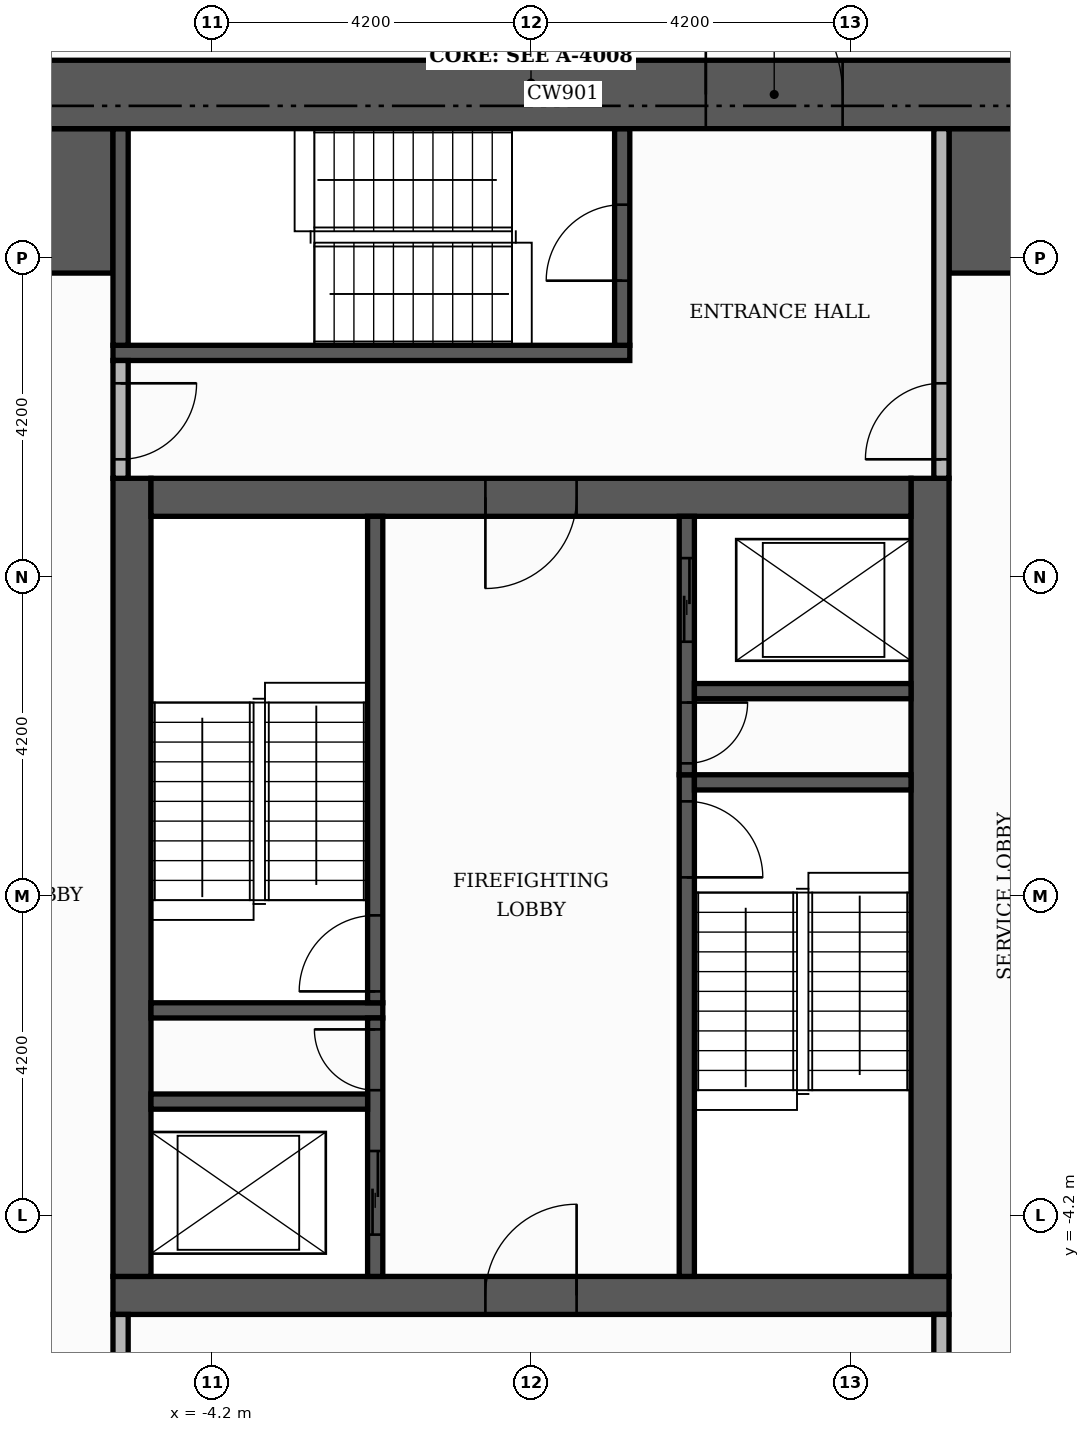
"""IFC4 building model, lengths in metres.
Left out: names, types, materials, properties, quantities, classifications, styles, units other than length and angle.
Written with IfcOpenShell. Run it as: python <this file> out.ifc"""

import sys

from ifc_helpers import new_model, si_unit, direction, frame, frame_2d, origin, place, context, subcontext, project, spatial, rectangle, extrude, element, fill, save


model = new_model("IFC4")
c1 = context("Model", 3, precision=1e-05, world=origin(), true_north=direction((0.0, 1.0)))
c2 = subcontext(c1, "Body", "Model", "MODEL_VIEW")
j1 = project(units=[si_unit("LENGTHUNIT", "METRE"), si_unit("PLANEANGLEUNIT", "RADIAN")], contexts=[c1])
p1 = place(None, origin())
s1 = spatial("IfcSite", under=j1, at=p1, CompositionType="ELEMENT")
p2 = place(p1, origin())
s2 = spatial("IfcBuilding", under=s1, at=p2, CompositionType="ELEMENT")
p3 = place(p2, frame((0.0, 0.0, 27.0)))
s3 = spatial("IfcBuildingStorey", under=s2, at=p3, CompositionType="ELEMENT", Elevation=27.0)
p4 = place(p3, frame((-5.5, -5.25, 0.0), z_axis=(0.0, 0.0, 1.0), x_axis=(1.0, 0.0, 0.0)))
e1 = element("IfcWall", 1, at=p4, inside=s3, PredefinedType="SHEAR", context=c2, shape_type="SweptSolid", body=[
    extrude(rectangle(XDim=11.0, YDim=0.5, at=frame_2d((5.5, 0.0))), origin(), (0.0, 0.0, 1.0), 3.48),
])
p5 = place(p4, frame((4.9, 0.0, 0.0)))
e2 = element("IfcOpeningElement", 2, at=p5, cuts=e1, PredefinedType="OPENING", context=c2, shape_type="SweptSolid", body=[
    extrude(rectangle(XDim=1.2, YDim=2.1, at=frame_2d((0.6, 1.05))), frame((0.0, 0.26, 0.0), z_axis=(0.0, -1.0, 0.0), x_axis=(1.0, 0.0, 0.0)), (0.0, 0.0, 1.0), 0.52),
])
for number, where, z_axis, x_axis in (
    (3, (-5.25, -5.0, 0.0), (0.0, 0.0, 1.0), (0.0, 1.0, 0.0)),
    (4, (5.25, -5.0, 0.0), (0.0, 0.0, 1.0), (0.0, 1.0, 0.0)),
):
    element("IfcWall", number, at=place(p3, frame(where, z_axis=z_axis, x_axis=x_axis)), inside=s3, PredefinedType="SHEAR", context=c2, shape_type="SweptSolid", body=[
        extrude(rectangle(XDim=10.5, YDim=0.5, at=frame_2d((5.25, 0.0))), origin(), (0.0, 0.0, 1.0), 3.48),
    ])
p6 = place(p3, frame((-5.0, 5.25, 0.0), z_axis=(0.0, 0.0, 1.0), x_axis=(1.0, 0.0, 0.0)))
e5 = element("IfcWall", 5, at=p6, inside=s3, PredefinedType="SHEAR", context=c2, shape_type="SweptSolid", body=[
    extrude(rectangle(XDim=10.0, YDim=0.5, at=frame_2d((5.0, 0.0))), origin(), (0.0, 0.0, 1.0), 3.48),
])
p7 = place(p6, frame((4.4, 0.0, 0.0)))
e6 = element("IfcOpeningElement", 6, at=p7, cuts=e5, PredefinedType="OPENING", context=c2, shape_type="SweptSolid", body=[
    extrude(rectangle(XDim=1.2, YDim=2.1, at=frame_2d((0.6, 1.05))), frame((0.0, 0.26, 0.0), z_axis=(0.0, -1.0, 0.0), x_axis=(1.0, 0.0, 0.0)), (0.0, 0.0, 1.0), 0.52),
])
for number, where, z_axis, x_axis in (
    (7, (-10.1, 9.15, 0.0), (0.0, 0.0, 1.0), (1.0, 0.0, 0.0)),
    (8, (5.5, 9.15, 0.0), (0.0, 0.0, 1.0), (1.0, 0.0, 0.0)),
):
    element("IfcWall", number, at=place(p3, frame(where, z_axis=z_axis, x_axis=x_axis)), inside=s3, PredefinedType="SHEAR", context=c2, shape_type="SweptSolid", body=[
        extrude(rectangle(XDim=4.6, YDim=1.9, at=frame_2d((2.3, 0.0))), origin(), (0.0, 0.0, 1.0), 3.48),
    ])
p8 = place(p3, frame((2.05, -5.0, 0.0), z_axis=(0.0, 0.0, 1.0), x_axis=(0.0, 1.0, 0.0)))
e9 = element("IfcWall", 9, at=p8, inside=s3, PredefinedType="SHEAR", context=c2, shape_type="SweptSolid", body=[
    extrude(rectangle(XDim=6.6, YDim=0.2, at=frame_2d((3.3, 0.0))), origin(), (0.0, 0.0, 1.0), 3.48),
])
p9 = place(p8, frame((5.25, 0.0, 0.0)))
e10 = element("IfcOpeningElement", 10, at=p9, cuts=e9, PredefinedType="OPENING", context=c2, shape_type="SweptSolid", body=[
    extrude(rectangle(XDim=1.0, YDim=2.1, at=frame_2d((0.5, 1.05))), frame((0.0, 0.11, 0.0), z_axis=(0.0, -1.0, 0.0), x_axis=(1.0, 0.0, 0.0)), (0.0, 0.0, 1.0), 0.22),
])
p10 = place(p3, frame((-5.0, -1.5, 0.0), z_axis=(0.0, 0.0, 1.0), x_axis=(1.0, 0.0, 0.0)))
e11 = element("IfcWall", 11, at=p10, inside=s3, PredefinedType="SHEAR", context=c2, shape_type="SweptSolid", body=[
    extrude(rectangle(XDim=3.05, YDim=0.2, at=frame_2d((1.525, 0.0))), origin(), (0.0, 0.0, 1.0), 3.48),
])
p11 = place(p3, frame((-2.05, -1.4, 0.0), z_axis=(0.0, 0.0, 1.0), x_axis=(0.0, 1.0, 0.0)))
e12 = element("IfcWall", 12, at=p11, inside=s3, PredefinedType="SHEAR", context=c2, shape_type="SweptSolid", body=[
    extrude(rectangle(XDim=6.4, YDim=0.2, at=frame_2d((3.2, 0.0))), origin(), (0.0, 0.0, 1.0), 3.48),
])
p12 = place(p11, frame((0.15, 0.0, 0.0)))
e13 = element("IfcOpeningElement", 13, at=p12, cuts=e12, PredefinedType="OPENING", context=c2, shape_type="SweptSolid", body=[
    extrude(rectangle(XDim=1.0, YDim=2.1, at=frame_2d((0.5, 1.05))), frame((0.0, 0.11, 0.0), z_axis=(0.0, -1.0, 0.0), x_axis=(1.0, 0.0, 0.0)), (0.0, 0.0, 1.0), 0.22),
])
p13 = place(p3, frame((2.15, 1.5, 0.0), z_axis=(0.0, 0.0, 1.0), x_axis=(1.0, 0.0, 0.0)))
e14 = element("IfcWall", 14, at=p13, inside=s3, PredefinedType="SHEAR", context=c2, shape_type="SweptSolid", body=[
    extrude(rectangle(XDim=2.85, YDim=0.2, at=frame_2d((1.425, 0.0))), origin(), (0.0, 0.0, 1.0), 3.48),
])
p14 = place(p3, frame((-5.5, 7.15, 0.0), z_axis=(0.0, 0.0, 1.0), x_axis=(1.0, 0.0, 0.0)))
e15 = element("IfcWall", 15, at=p14, inside=s3, PredefinedType="SHEAR", context=c2, shape_type="SweptSolid", body=[
    extrude(rectangle(XDim=6.8, YDim=0.2, at=frame_2d((3.4, 0.0))), origin(), (0.0, 0.0, 1.0), 3.48),
])
p15 = place(p3, frame((-5.4, 7.25, 0.0), z_axis=(0.0, 0.0, 1.0), x_axis=(0.0, 1.0, 0.0)))
e16 = element("IfcWall", 16, at=p15, inside=s3, PredefinedType="SHEAR", context=c2, shape_type="SweptSolid", body=[
    extrude(rectangle(XDim=2.85, YDim=0.2, at=frame_2d((1.425, 0.0))), origin(), (0.0, 0.0, 1.0), 3.48),
])
p16 = place(p3, frame((1.2, 7.25, 0.0), z_axis=(0.0, 0.0, 1.0), x_axis=(0.0, 1.0, 0.0)))
e17 = element("IfcWall", 17, at=p16, inside=s3, PredefinedType="SHEAR", context=c2, shape_type="SweptSolid", body=[
    extrude(rectangle(XDim=2.85, YDim=0.2, at=frame_2d((1.425, 0.0))), origin(), (0.0, 0.0, 1.0), 3.48),
])
p17 = place(p16, frame((0.85, 0.0, 0.0)))
e18 = element("IfcOpeningElement", 18, at=p17, cuts=e17, PredefinedType="OPENING", context=c2, shape_type="SweptSolid", body=[
    extrude(rectangle(XDim=1.0, YDim=2.1, at=frame_2d((0.5, 1.05))), frame((0.0, 0.11, 0.0), z_axis=(0.0, -1.0, 0.0), x_axis=(1.0, 0.0, 0.0)), (0.0, 0.0, 1.0), 0.22),
])
p18 = place(p3, frame((-2.05, -5.0, 0.0), z_axis=(0.0, 0.0, 1.0), x_axis=(0.0, 1.0, 0.0)))
e19 = element("IfcWall", 19, at=p18, inside=s3, PredefinedType="SHEAR", context=c2, shape_type="SweptSolid", body=[
    extrude(rectangle(XDim=3.4, YDim=0.2, at=frame_2d((1.7, 0.0))), origin(), (0.0, 0.0, 1.0), 3.48),
])
p19 = place(p18, frame((0.55, 0.0, 0.0)))
e20 = element("IfcOpeningElement", 20, at=p19, cuts=e19, PredefinedType="OPENING", context=c2, shape_type="SweptSolid", body=[
    extrude(rectangle(XDim=1.1, YDim=2.1, at=frame_2d((0.55, 1.05))), frame((0.0, 0.11, 0.0), z_axis=(0.0, -1.0, 0.0), x_axis=(1.0, 0.0, 0.0)), (0.0, 0.0, 1.0), 0.22),
])
p20 = place(p18, frame((2.45, 0.0, 0.0)))
e21 = element("IfcOpeningElement", 21, at=p20, cuts=e19, PredefinedType="OPENING", context=c2, shape_type="SweptSolid", body=[
    extrude(rectangle(XDim=0.8, YDim=2.1, at=frame_2d((0.4, 1.05))), frame((0.0, 0.11, 0.0), z_axis=(0.0, -1.0, 0.0), x_axis=(1.0, 0.0, 0.0)), (0.0, 0.0, 1.0), 0.22),
])
p21 = place(p3, frame((-5.0, -2.7, 0.0), z_axis=(0.0, 0.0, 1.0), x_axis=(1.0, 0.0, 0.0)))
e22 = element("IfcWall", 22, at=p21, inside=s3, PredefinedType="SHEAR", context=c2, shape_type="SweptSolid", body=[
    extrude(rectangle(XDim=2.85, YDim=0.2, at=frame_2d((1.425, 0.0))), origin(), (0.0, 0.0, 1.0), 3.48),
])
p22 = place(p3, frame((2.05, 1.6, 0.0), z_axis=(0.0, 0.0, 1.0), x_axis=(0.0, 1.0, 0.0)))
e23 = element("IfcWall", 23, at=p22, inside=s3, PredefinedType="SHEAR", context=c2, shape_type="SweptSolid", body=[
    extrude(rectangle(XDim=3.4, YDim=0.2, at=frame_2d((1.7, 0.0))), origin(), (0.0, 0.0, 1.0), 3.48),
])
p23 = place(p22, frame((1.75, 0.0, 0.0)))
e24 = element("IfcOpeningElement", 24, at=p23, cuts=e23, PredefinedType="OPENING", context=c2, shape_type="SweptSolid", body=[
    extrude(rectangle(XDim=1.1, YDim=2.1, at=frame_2d((0.55, 1.05))), frame((0.0, 0.11, 0.0), z_axis=(0.0, -1.0, 0.0), x_axis=(1.0, 0.0, 0.0)), (0.0, 0.0, 1.0), 0.22),
])
p24 = place(p22, frame((0.15, 0.0, 0.0)))
e25 = element("IfcOpeningElement", 25, at=p24, cuts=e23, PredefinedType="OPENING", context=c2, shape_type="SweptSolid", body=[
    extrude(rectangle(XDim=0.8, YDim=2.1, at=frame_2d((0.4, 1.05))), frame((0.0, 0.11, 0.0), z_axis=(0.0, -1.0, 0.0), x_axis=(1.0, 0.0, 0.0)), (0.0, 0.0, 1.0), 0.22),
])
p25 = place(p3, frame((2.15, 2.7, 0.0), z_axis=(0.0, 0.0, 1.0), x_axis=(1.0, 0.0, 0.0)))
e26 = element("IfcWall", 26, at=p25, inside=s3, PredefinedType="SHEAR", context=c2, shape_type="SweptSolid", body=[
    extrude(rectangle(XDim=2.85, YDim=0.2, at=frame_2d((1.425, 0.0))), origin(), (0.0, 0.0, 1.0), 3.48),
])
p26 = place(p3, frame((-11.0, 10.55, 0.0), z_axis=(0.0, 0.0, 1.0), x_axis=(1.0, 0.0, 0.0)))
e27 = element("IfcWall", 27, at=p26, inside=s3, PredefinedType="SHEAR", context=c2, shape_type="SweptSolid", body=[
    extrude(rectangle(XDim=22.0, YDim=0.9, at=frame_2d((11.0, 0.0))), origin(), (0.0, 0.0, 1.0), 3.48),
])
p27 = place(p26, frame((13.3, 0.0, 0.0)))
e28 = element("IfcOpeningElement", 28, at=p27, cuts=e27, PredefinedType="OPENING", context=c2, shape_type="SweptSolid", body=[
    extrude(rectangle(XDim=1.8, YDim=2.2, at=frame_2d((0.9, 1.1))), frame((0.0, 0.46, 0.0), z_axis=(0.0, -1.0, 0.0), x_axis=(1.0, 0.0, 0.0)), (0.0, 0.0, 1.0), 0.92),
])
p28 = place(p3, frame((-5.4, -10.1, 0.0), z_axis=(0.0, 0.0, 1.0), x_axis=(0.0, 1.0, 0.0)))
e29 = element("IfcWall", 29, at=p28, inside=s3, PredefinedType="PARTITIONING", context=c2, shape_type="SweptSolid", body=[
    extrude(rectangle(XDim=4.6, YDim=0.2, at=frame_2d((2.3, 0.0))), origin(), (0.0, 0.0, 1.0), 3.48),
])
p29 = place(p28, frame((2.9, 0.0, 0.0)))
e30 = element("IfcOpeningElement", 30, at=p29, cuts=e29, PredefinedType="OPENING", context=c2, shape_type="SweptSolid", body=[
    extrude(rectangle(XDim=1.0, YDim=2.1, at=frame_2d((0.5, 1.05))), frame((0.0, 0.11, 0.0), z_axis=(0.0, -1.0, 0.0), x_axis=(1.0, 0.0, 0.0)), (0.0, 0.0, 1.0), 0.22),
])
p30 = place(p3, frame((5.4, -7.9, 0.0), z_axis=(0.0, 0.0, 1.0), x_axis=(0.0, 1.0, 0.0)))
e31 = element("IfcWall", 31, at=p30, inside=s3, PredefinedType="PARTITIONING", context=c2, shape_type="SweptSolid", body=[
    extrude(rectangle(XDim=2.4, YDim=0.2, at=frame_2d((1.2, 0.0))), origin(), (0.0, 0.0, 1.0), 3.48),
])
p31 = place(p30, frame((0.7, 0.0, 0.0)))
e32 = element("IfcOpeningElement", 32, at=p31, cuts=e31, PredefinedType="OPENING", context=c2, shape_type="SweptSolid", body=[
    extrude(rectangle(XDim=1.0, YDim=2.1, at=frame_2d((0.5, 1.05))), frame((0.0, 0.11, 0.0), z_axis=(0.0, -1.0, 0.0), x_axis=(1.0, 0.0, 0.0)), (0.0, 0.0, 1.0), 0.22),
])
p32 = place(p3, frame((-5.4, 5.5, 0.0), z_axis=(0.0, 0.0, 1.0), x_axis=(0.0, 1.0, 0.0)))
e33 = element("IfcWall", 33, at=p32, inside=s3, PredefinedType="PARTITIONING", context=c2, shape_type="SweptSolid", body=[
    extrude(rectangle(XDim=1.55, YDim=0.2, at=frame_2d((0.775, 0.0))), origin(), (0.0, 0.0, 1.0), 3.48),
])
p33 = place(p32, frame((0.25, 0.0, 0.0)))
e34 = element("IfcOpeningElement", 34, at=p33, cuts=e33, PredefinedType="OPENING", context=c2, shape_type="SweptSolid", body=[
    extrude(rectangle(XDim=1.0, YDim=2.1, at=frame_2d((0.5, 1.05))), frame((0.0, 0.11, 0.0), z_axis=(0.0, -1.0, 0.0), x_axis=(1.0, 0.0, 0.0)), (0.0, 0.0, 1.0), 0.22),
])
p34 = place(p3, frame((5.4, 5.5, 0.0), z_axis=(0.0, 0.0, 1.0), x_axis=(0.0, 1.0, 0.0)))
e35 = element("IfcWall", 35, at=p34, inside=s3, PredefinedType="PARTITIONING", context=c2, shape_type="SweptSolid", body=[
    extrude(rectangle(XDim=4.6, YDim=0.2, at=frame_2d((2.3, 0.0))), origin(), (0.0, 0.0, 1.0), 3.48),
])
p35 = place(p34, frame((0.25, 0.0, 0.0)))
e36 = element("IfcOpeningElement", 36, at=p35, cuts=e35, PredefinedType="OPENING", context=c2, shape_type="SweptSolid", body=[
    extrude(rectangle(XDim=1.0, YDim=2.1, at=frame_2d((0.5, 1.05))), frame((0.0, 0.11, 0.0), z_axis=(0.0, -1.0, 0.0), x_axis=(1.0, 0.0, 0.0)), (0.0, 0.0, 1.0), 0.22),
])
p36 = place(p23, origin())
e37 = element("IfcDoor", 37, at=p36, inside=s3, OperationType="SLIDING_TO_LEFT", PredefinedType="DOOR", context=c2, shape_type="SweptSolid", body=[
    extrude(rectangle(XDim=1.1, YDim=2.1, at=frame_2d((0.55, 1.05))), frame((0.0, 0.025, 0.0), z_axis=(0.0, -1.0, 0.0), x_axis=(1.0, 0.0, 0.0)), (0.0, 0.0, 1.0), 0.05),
])
fill(e24, e37)
p37 = place(p19, origin())
e38 = element("IfcDoor", 38, at=p37, inside=s3, OperationType="SLIDING_TO_LEFT", PredefinedType="DOOR", context=c2, shape_type="SweptSolid", body=[
    extrude(rectangle(XDim=1.1, YDim=2.1, at=frame_2d((0.55, 1.05))), frame((0.0, 0.025, 0.0), z_axis=(0.0, -1.0, 0.0), x_axis=(1.0, 0.0, 0.0)), (0.0, 0.0, 1.0), 0.05),
])
fill(e20, e38)
p38 = place(p12, origin())
e39 = element("IfcDoor", 39, at=p38, inside=s3, OperationType="SINGLE_SWING_LEFT", PredefinedType="DOOR", context=c2, shape_type="SweptSolid", body=[
    extrude(rectangle(XDim=1.0, YDim=2.1, at=frame_2d((0.5, 1.05))), frame((0.0, 0.025, 0.0), z_axis=(0.0, -1.0, 0.0), x_axis=(1.0, 0.0, 0.0)), (0.0, 0.0, 1.0), 0.05),
])
fill(e13, e39)
p39 = place(p9, frame((1.0, 0.0, 0.0), z_axis=(0.0, 0.0, 1.0), x_axis=(-1.0, 0.0, 0.0)))
e40 = element("IfcDoor", 40, at=p39, inside=s3, OperationType="SINGLE_SWING_LEFT", PredefinedType="DOOR", context=c2, shape_type="SweptSolid", body=[
    extrude(rectangle(XDim=1.0, YDim=2.1, at=frame_2d((0.5, 1.05))), frame((0.0, 0.025, 0.0), z_axis=(0.0, -1.0, 0.0), x_axis=(1.0, 0.0, 0.0)), (0.0, 0.0, 1.0), 0.05),
])
fill(e10, e40)
p40 = place(p24, frame((0.8, 0.0, 0.0), z_axis=(0.0, 0.0, 1.0), x_axis=(-1.0, 0.0, 0.0)))
e41 = element("IfcDoor", 41, at=p40, inside=s3, OperationType="SINGLE_SWING_RIGHT", PredefinedType="DOOR", context=c2, shape_type="SweptSolid", body=[
    extrude(rectangle(XDim=0.8, YDim=2.1, at=frame_2d((0.4, 1.05))), frame((0.0, 0.025, 0.0), z_axis=(0.0, -1.0, 0.0), x_axis=(1.0, 0.0, 0.0)), (0.0, 0.0, 1.0), 0.05),
])
fill(e25, e41)
p41 = place(p20, origin())
e42 = element("IfcDoor", 42, at=p41, inside=s3, OperationType="SINGLE_SWING_RIGHT", PredefinedType="DOOR", context=c2, shape_type="SweptSolid", body=[
    extrude(rectangle(XDim=0.8, YDim=2.1, at=frame_2d((0.4, 1.05))), frame((0.0, 0.025, 0.0), z_axis=(0.0, -1.0, 0.0), x_axis=(1.0, 0.0, 0.0)), (0.0, 0.0, 1.0), 0.05),
])
fill(e21, e42)
p42 = place(p7, frame((1.2, 0.0, 0.0), z_axis=(0.0, 0.0, 1.0), x_axis=(-1.0, 0.0, 0.0)))
e43 = element("IfcDoor", 43, at=p42, inside=s3, OperationType="SINGLE_SWING_LEFT", PredefinedType="DOOR", context=c2, shape_type="SweptSolid", body=[
    extrude(rectangle(XDim=1.2, YDim=2.1, at=frame_2d((0.6, 1.05))), frame((0.0, 0.025, 0.0), z_axis=(0.0, -1.0, 0.0), x_axis=(1.0, 0.0, 0.0)), (0.0, 0.0, 1.0), 0.05),
])
fill(e6, e43)
p43 = place(p5, origin())
e44 = element("IfcDoor", 44, at=p43, inside=s3, OperationType="SINGLE_SWING_RIGHT", PredefinedType="DOOR", context=c2, shape_type="SweptSolid", body=[
    extrude(rectangle(XDim=1.2, YDim=2.1, at=frame_2d((0.6, 1.05))), frame((0.0, 0.025, 0.0), z_axis=(0.0, -1.0, 0.0), x_axis=(1.0, 0.0, 0.0)), (0.0, 0.0, 1.0), 0.05),
])
fill(e2, e44)
p44 = place(p17, origin())
e45 = element("IfcDoor", 45, at=p44, inside=s3, OperationType="SINGLE_SWING_LEFT", PredefinedType="DOOR", context=c2, shape_type="SweptSolid", body=[
    extrude(rectangle(XDim=1.0, YDim=2.1, at=frame_2d((0.5, 1.05))), frame((0.0, 0.025, 0.0), z_axis=(0.0, -1.0, 0.0), x_axis=(1.0, 0.0, 0.0)), (0.0, 0.0, 1.0), 0.05),
])
fill(e18, e45)
p45 = place(p33, frame((1.0, 0.0, 0.0), z_axis=(0.0, 0.0, 1.0), x_axis=(-1.0, 0.0, 0.0)))
e46 = element("IfcDoor", 46, at=p45, inside=s3, OperationType="SINGLE_SWING_RIGHT", PredefinedType="DOOR", context=c2, shape_type="SweptSolid", body=[
    extrude(rectangle(XDim=1.0, YDim=2.1, at=frame_2d((0.5, 1.05))), frame((0.0, 0.025, 0.0), z_axis=(0.0, -1.0, 0.0), x_axis=(1.0, 0.0, 0.0)), (0.0, 0.0, 1.0), 0.05),
])
fill(e34, e46)
p46 = place(p35, origin())
e47 = element("IfcDoor", 47, at=p46, inside=s3, OperationType="SINGLE_SWING_LEFT", PredefinedType="DOOR", context=c2, shape_type="SweptSolid", body=[
    extrude(rectangle(XDim=1.0, YDim=2.1, at=frame_2d((0.5, 1.05))), frame((0.0, 0.025, 0.0), z_axis=(0.0, -1.0, 0.0), x_axis=(1.0, 0.0, 0.0)), (0.0, 0.0, 1.0), 0.05),
])
fill(e36, e47)
p47 = place(p27, origin())
e48 = element("IfcDoor", 48, at=p47, inside=s3, OperationType="DOUBLE_DOOR_SINGLE_SWING", PredefinedType="DOOR", context=c2, shape_type="SweptSolid", body=[
    extrude(rectangle(XDim=1.8, YDim=2.2, at=frame_2d((0.9, 1.1))), frame((0.0, 0.025, 0.0), z_axis=(0.0, -1.0, 0.0), x_axis=(1.0, 0.0, 0.0)), (0.0, 0.0, 1.0), 0.05),
])
fill(e28, e48)
save(model, sys.argv[1])
